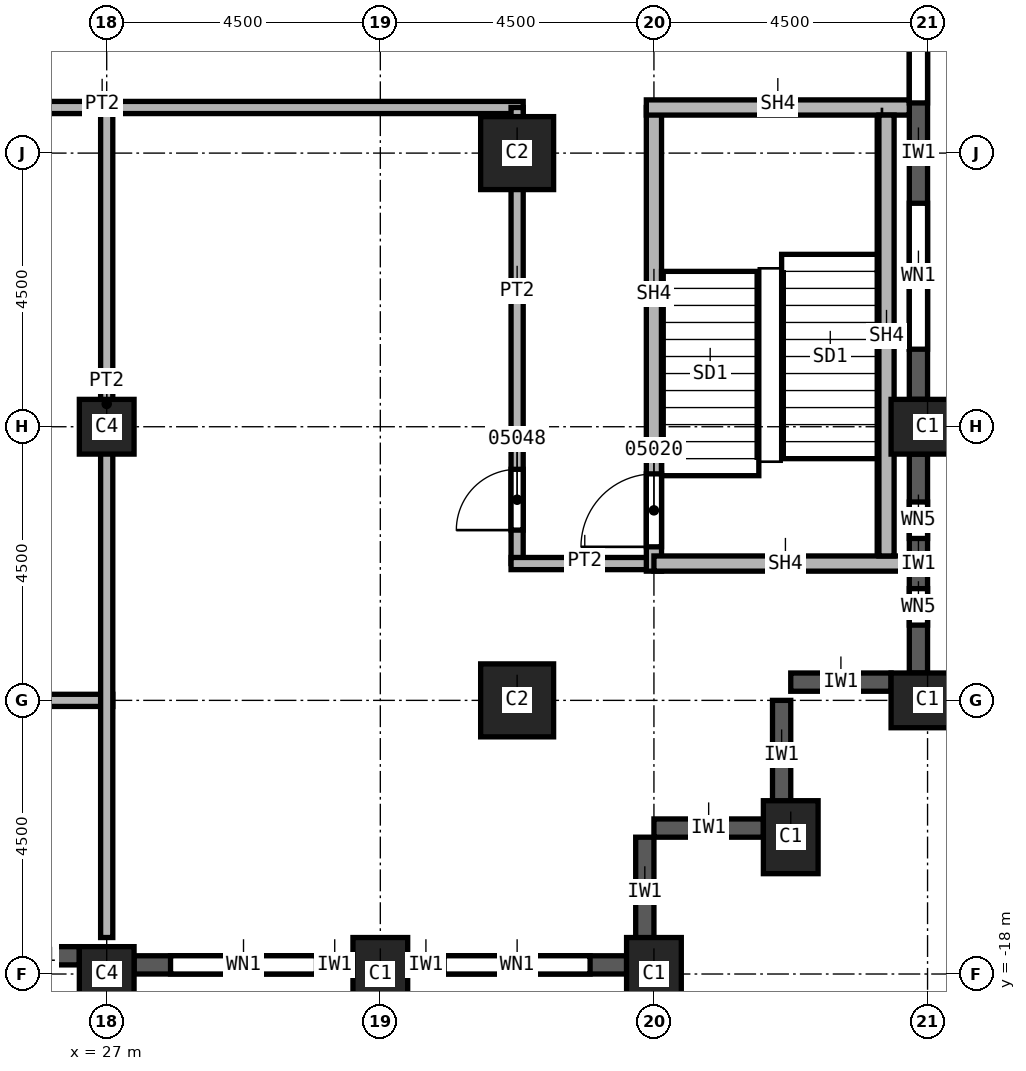
"""IFC4 building model, lengths in metres.
Left out: names, types, materials, properties, quantities, classifications, styles, units other than length and angle.
Written with IfcOpenShell. Run it as: python <this file> out.ifc"""

import sys

from ifc_helpers import new_model, si_unit, direction, frame, frame_2d, origin, origin_2d, place, context, subcontext, project, spatial, rectangle, extrude, element, fill, save


model = new_model("IFC4")
c1 = context("Model", 3, precision=1e-05, world=origin(), true_north=direction((0.0, 1.0)))
c2 = subcontext(c1, "Body", "Model", "MODEL_VIEW")
j1 = project(units=[si_unit("LENGTHUNIT", "METRE"), si_unit("PLANEANGLEUNIT", "RADIAN")], contexts=[c1])
p1 = place(None, origin())
s1 = spatial("IfcSite", under=j1, at=p1, CompositionType="ELEMENT")
p2 = place(p1, origin())
s2 = spatial("IfcBuilding", under=s1, at=p2, CompositionType="ELEMENT")
p3 = place(p2, frame((0.0, 0.0, 116.0)))
s3 = spatial("IfcBuildingStorey", under=s2, at=p3, CompositionType="ELEMENT", Elevation=116.0)
for number, where, z_axis, x_axis in (
    (1, (40.5, -9.0, 0.0), (0.0, 0.0, 1.0), (0.0, 1.0, 0.0)),
    (2, (40.5, -13.5, 0.0), (0.0, 0.0, 1.0), (0.0, 1.0, 0.0)),
    (3, (38.25, -15.75, 0.0), (0.0, 0.0, 1.0), (1.0, 0.0, 0.0)),
    (4, (31.5, -18.0, 0.0), (0.0, 0.0, 1.0), (1.0, 0.0, 0.0)),
    (5, (36.0, -18.0, 0.0), (0.0, 0.0, 1.0), (1.0, 0.0, 0.0)),
):
    element("IfcColumn", number, at=place(p3, frame(where, z_axis=z_axis, x_axis=x_axis)), inside=s3, PredefinedType="COLUMN", context=c2, shape_type="SweptSolid", body=[
        extrude(rectangle(XDim=0.9, YDim=1.2, at=origin_2d()), origin(), (0.0, 0.0, 1.0), 3.6),
    ])
for number, where, z_axis, x_axis in (
    (6, (33.75, -4.5, 0.0), (0.0, 0.0, 1.0), (1.0, 0.0, 0.0)),
    (7, (33.75, -13.5, 0.0), (0.0, 0.0, 1.0), (1.0, 0.0, 0.0)),
):
    element("IfcColumn", number, at=place(p3, frame(where, z_axis=z_axis, x_axis=x_axis)), inside=s3, PredefinedType="COLUMN", context=c2, shape_type="SweptSolid", body=[
        extrude(rectangle(XDim=1.2, YDim=1.2, at=origin_2d()), origin(), (0.0, 0.0, 1.0), 3.6),
    ])
for number, where, z_axis, x_axis in (
    (8, (27.0, -9.0, 0.0), (0.0, 0.0, 1.0), (1.0, 0.0, 0.0)),
    (9, (27.0, -18.0, 0.0), (0.0, 0.0, 1.0), (1.0, 0.0, 0.0)),
):
    element("IfcColumn", number, at=place(p3, frame(where, z_axis=z_axis, x_axis=x_axis)), inside=s3, PredefinedType="COLUMN", context=c2, shape_type="SweptSolid", body=[
        extrude(rectangle(XDim=0.9, YDim=0.9, at=origin_2d()), origin(), (0.0, 0.0, 1.0), 3.6),
    ])
for number, where, z_axis, x_axis in (
    (10, (35.85, -17.55, 0.0), (0.0, 0.0, 1.0), (0.0, 1.0, 0.0)),
    (11, (37.8, -15.6, 0.0), (0.0, 0.0, 1.0), (-1.0, 0.0, 0.0)),
    (12, (38.1, -15.3, 0.0), (0.0, 0.0, 1.0), (0.0, 1.0, 0.0)),
):
    element("IfcWall", number, at=place(p3, frame(where, z_axis=z_axis, x_axis=x_axis)), inside=s3, PredefinedType="SOLIDWALL", context=c2, shape_type="SweptSolid", body=[
        extrude(rectangle(XDim=1.8, YDim=0.3, at=frame_2d((0.9, 0.0))), origin(), (0.0, 0.0, 1.0), 3.0),
    ])
p4 = place(p3, frame((39.9, -13.2, 0.0), z_axis=(0.0, 0.0, 1.0), x_axis=(-1.0, 0.0, 0.0)))
e13 = element("IfcWall", 13, at=p4, inside=s3, PredefinedType="SOLIDWALL", context=c2, shape_type="SweptSolid", body=[
    extrude(rectangle(XDim=1.65, YDim=0.3, at=frame_2d((0.825, 0.0))), origin(), (0.0, 0.0, 1.0), 3.0),
])
p5 = place(p3, frame((25.2, -17.7, 0.0), z_axis=(0.0, 0.0, 1.0), x_axis=(1.0, 0.0, 0.0)))
e14 = element("IfcWall", 14, at=p5, inside=s3, PredefinedType="SOLIDWALL", context=c2, shape_type="SweptSolid", body=[
    extrude(rectangle(XDim=1.35, YDim=0.3, at=frame_2d((0.675, 0.0))), origin(), (0.0, 0.0, 1.0), 3.0),
])
p6 = place(p3, frame((27.45, -17.85, 0.0), z_axis=(0.0, 0.0, 1.0), x_axis=(1.0, 0.0, 0.0)))
e15 = element("IfcWall", 15, at=p6, inside=s3, PredefinedType="SOLIDWALL", context=c2, shape_type="SweptSolid", body=[
    extrude(rectangle(XDim=3.6, YDim=0.3, at=frame_2d((1.8, 0.0))), origin(), (0.0, 0.0, 1.0), 3.0),
])
p7 = place(p6, frame((0.6, 0.0, 0.8)))
e16 = element("IfcOpeningElement", 16, at=p7, cuts=e15, PredefinedType="OPENING", context=c2, shape_type="SweptSolid", body=[
    extrude(rectangle(XDim=2.4, YDim=1.95, at=frame_2d((1.2, 0.975))), frame((0.0, 0.15, 0.0), z_axis=(0.0, -1.0, 0.0), x_axis=(1.0, 0.0, 0.0)), (0.0, 0.0, 1.0), 0.3),
])
p8 = place(p3, frame((31.95, -17.85, 0.0), z_axis=(0.0, 0.0, 1.0), x_axis=(1.0, 0.0, 0.0)))
e17 = element("IfcWall", 17, at=p8, inside=s3, PredefinedType="SOLIDWALL", context=c2, shape_type="SweptSolid", body=[
    extrude(rectangle(XDim=3.6, YDim=0.3, at=frame_2d((1.8, 0.0))), origin(), (0.0, 0.0, 1.0), 3.0),
])
p9 = place(p8, frame((0.6, 0.0, 0.8)))
e18 = element("IfcOpeningElement", 18, at=p9, cuts=e17, PredefinedType="OPENING", context=c2, shape_type="SweptSolid", body=[
    extrude(rectangle(XDim=2.4, YDim=1.95, at=frame_2d((1.2, 0.975))), frame((0.0, 0.15, 0.0), z_axis=(0.0, -1.0, 0.0), x_axis=(1.0, 0.0, 0.0)), (0.0, 0.0, 1.0), 0.3),
])
p10 = place(p3, frame((40.35, -13.05, 0.0), z_axis=(0.0, 0.0, 1.0), x_axis=(0.0, 1.0, 0.0)))
e19 = element("IfcWall", 19, at=p10, inside=s3, PredefinedType="SOLIDWALL", context=c2, shape_type="SweptSolid", body=[
    extrude(rectangle(XDim=3.6, YDim=0.3, at=frame_2d((1.8, 0.0))), origin(), (0.0, 0.0, 1.0), 3.0),
])
p11 = place(p10, frame((0.788, 0.0, 0.8)))
e20 = element("IfcOpeningElement", 20, at=p11, cuts=e19, PredefinedType="OPENING", context=c2, shape_type="SweptSolid", body=[
    extrude(rectangle(XDim=0.6, YDim=1.95, at=frame_2d((0.3, 0.975))), frame((0.0, 0.15, 0.0), z_axis=(0.0, -1.0, 0.0), x_axis=(1.0, 0.0, 0.0)), (0.0, 0.0, 1.0), 0.3),
])
p12 = place(p10, frame((2.212, 0.0, 0.8)))
e21 = element("IfcOpeningElement", 21, at=p12, cuts=e19, PredefinedType="OPENING", context=c2, shape_type="SweptSolid", body=[
    extrude(rectangle(XDim=0.6, YDim=1.95, at=frame_2d((0.3, 0.975))), frame((0.0, 0.15, 0.0), z_axis=(0.0, -1.0, 0.0), x_axis=(1.0, 0.0, 0.0)), (0.0, 0.0, 1.0), 0.3),
])
p13 = place(p3, frame((40.35, -8.55, 0.0), z_axis=(0.0, 0.0, 1.0), x_axis=(0.0, 1.0, 0.0)))
e22 = element("IfcWall", 22, at=p13, inside=s3, PredefinedType="SOLIDWALL", context=c2, shape_type="SweptSolid", body=[
    extrude(rectangle(XDim=8.1, YDim=0.3, at=frame_2d((4.05, 0.0))), origin(), (0.0, 0.0, 1.0), 3.0),
])
p14 = place(p13, frame((0.825, 0.0, 0.8)))
e23 = element("IfcOpeningElement", 23, at=p14, cuts=e22, PredefinedType="OPENING", context=c2, shape_type="SweptSolid", body=[
    extrude(rectangle(XDim=2.4, YDim=1.95, at=frame_2d((1.2, 0.975))), frame((0.0, 0.15, 0.0), z_axis=(0.0, -1.0, 0.0), x_axis=(1.0, 0.0, 0.0)), (0.0, 0.0, 1.0), 0.3),
])
p15 = place(p13, frame((4.875, 0.0, 0.8)))
e24 = element("IfcOpeningElement", 24, at=p15, cuts=e22, PredefinedType="OPENING", context=c2, shape_type="SweptSolid", body=[
    extrude(rectangle(XDim=2.4, YDim=1.95, at=frame_2d((1.2, 0.975))), frame((0.0, 0.15, 0.0), z_axis=(0.0, -1.0, 0.0), x_axis=(1.0, 0.0, 0.0)), (0.0, 0.0, 1.0), 0.3),
])
p16 = place(p3, frame((19.9, -13.5, 0.0), z_axis=(0.0, 0.0, 1.0), x_axis=(1.0, 0.0, 0.0)))
e25 = element("IfcWall", 25, at=p16, inside=s3, PredefinedType="PARTITIONING", context=c2, shape_type="SweptSolid", body=[
    extrude(rectangle(XDim=7.2, YDim=0.2, at=frame_2d((3.6, 0.0))), origin(), (0.0, 0.0, 1.0), 3.6),
])
p17 = place(p3, frame((33.85, -3.75, 0.0), z_axis=(0.0, 0.0, 1.0), x_axis=(-1.0, 0.0, 0.0)))
e26 = element("IfcWall", 26, at=p17, inside=s3, PredefinedType="PARTITIONING", context=c2, shape_type="SweptSolid", body=[
    extrude(rectangle(XDim=13.95, YDim=0.2, at=frame_2d((6.975, 0.0))), origin(), (0.0, 0.0, 1.0), 3.6),
])
p18 = place(p3, frame((27.0, -3.75, 0.0), z_axis=(0.0, 0.0, 1.0), x_axis=(0.0, -1.0, 0.0)))
e27 = element("IfcWall", 27, at=p18, inside=s3, PredefinedType="PARTITIONING", context=c2, shape_type="SweptSolid", body=[
    extrude(rectangle(XDim=13.65, YDim=0.2, at=frame_2d((6.825, 0.0))), origin(), (0.0, 0.0, 1.0), 3.6),
])
p19 = place(p3, frame((33.75, -11.25, 0.0), z_axis=(0.0, 0.0, 1.0), x_axis=(0.0, 1.0, 0.0)))
e28 = element("IfcWall", 28, at=p19, inside=s3, PredefinedType="PARTITIONING", context=c2, shape_type="SweptSolid", body=[
    extrude(rectangle(XDim=7.5, YDim=0.2, at=frame_2d((3.75, 0.0))), origin(), (0.0, 0.0, 1.0), 3.6),
])
p20 = place(p19, frame((0.55, 0.0, 0.0)))
e29 = element("IfcOpeningElement", 29, at=p20, cuts=e28, PredefinedType="OPENING", context=c2, shape_type="SweptSolid", body=[
    extrude(rectangle(XDim=1.0, YDim=2.1, at=frame_2d((0.5, 1.05))), frame((0.0, 0.1, 0.0), z_axis=(0.0, -1.0, 0.0), x_axis=(1.0, 0.0, 0.0)), (0.0, 0.0, 1.0), 0.2),
])
p21 = place(p3, frame((36.0, -11.25, 0.0), z_axis=(0.0, 0.0, 1.0), x_axis=(-1.0, 0.0, 0.0)))
e30 = element("IfcWall", 30, at=p21, inside=s3, PredefinedType="PARTITIONING", context=c2, shape_type="SweptSolid", body=[
    extrude(rectangle(XDim=2.35, YDim=0.2, at=frame_2d((1.175, 0.0))), origin(), (0.0, 0.0, 1.0), 3.6),
])
p22 = place(p3, frame((36.0, -11.375, 0.0), z_axis=(0.0, 0.0, 1.0), x_axis=(0.0, 1.0, 0.0)))
e31 = element("IfcWall", 31, at=p22, inside=s3, PredefinedType="SOLIDWALL", context=c2, shape_type="SweptSolid", body=[
    extrude(rectangle(XDim=7.625, YDim=0.25, at=frame_2d((3.812, 0.0))), origin(), (0.0, 0.0, 1.0), 3.6),
])
p23 = place(p22, frame((0.4, 0.0, 0.0)))
e32 = element("IfcOpeningElement", 32, at=p23, cuts=e31, PredefinedType="OPENING", context=c2, shape_type="SweptSolid", body=[
    extrude(rectangle(XDim=1.2, YDim=2.1, at=frame_2d((0.6, 1.05))), frame((0.0, 0.125, 0.0), z_axis=(0.0, -1.0, 0.0), x_axis=(1.0, 0.0, 0.0)), (0.0, 0.0, 1.0), 0.25),
])
p24 = place(p3, frame((40.2, -11.25, 0.0), z_axis=(0.0, 0.0, 1.0), x_axis=(-1.0, 0.0, 0.0)))
e33 = element("IfcWall", 33, at=p24, inside=s3, PredefinedType="SOLIDWALL", context=c2, shape_type="SweptSolid", body=[
    extrude(rectangle(XDim=4.2, YDim=0.25, at=frame_2d((2.1, 0.0))), origin(), (0.0, 0.0, 1.0), 3.6),
])
p25 = place(p3, frame((40.2, -3.75, 0.0), z_axis=(0.0, 0.0, 1.0), x_axis=(-1.0, 0.0, 0.0)))
e34 = element("IfcWall", 34, at=p25, inside=s3, PredefinedType="SOLIDWALL", context=c2, shape_type="SweptSolid", body=[
    extrude(rectangle(XDim=4.325, YDim=0.25, at=frame_2d((2.163, 0.0))), origin(), (0.0, 0.0, 1.0), 3.6),
])
p26 = place(p3, frame((39.825, -11.125, 0.0), z_axis=(0.0, 0.0, 1.0), x_axis=(0.0, 1.0, 0.0)))
e35 = element("IfcWall", 35, at=p26, inside=s3, PredefinedType="SOLIDWALL", context=c2, shape_type="SweptSolid", body=[
    extrude(rectangle(XDim=7.25, YDim=0.25, at=frame_2d((3.625, 0.0))), origin(), (0.0, 0.0, 1.0), 3.6),
])
p27 = place(p7, origin())
e36 = element("IfcWindow", 36, at=p27, inside=s3, PartitioningType="SINGLE_PANEL", PredefinedType="WINDOW", context=c2, shape_type="SweptSolid", body=[
    extrude(rectangle(XDim=2.4, YDim=1.95, at=frame_2d((1.2, 0.975))), frame((0.0, 0.03, 0.0), z_axis=(0.0, -1.0, 0.0), x_axis=(1.0, 0.0, 0.0)), (0.0, 0.0, 1.0), 0.06),
])
fill(e16, e36)
p28 = place(p9, origin())
e37 = element("IfcWindow", 37, at=p28, inside=s3, PartitioningType="SINGLE_PANEL", PredefinedType="WINDOW", context=c2, shape_type="SweptSolid", body=[
    extrude(rectangle(XDim=2.4, YDim=1.95, at=frame_2d((1.2, 0.975))), frame((0.0, 0.03, 0.0), z_axis=(0.0, -1.0, 0.0), x_axis=(1.0, 0.0, 0.0)), (0.0, 0.0, 1.0), 0.06),
])
fill(e18, e37)
p29 = place(p14, origin())
e38 = element("IfcWindow", 38, at=p29, inside=s3, PartitioningType="SINGLE_PANEL", PredefinedType="WINDOW", context=c2, shape_type="SweptSolid", body=[
    extrude(rectangle(XDim=2.4, YDim=1.95, at=frame_2d((1.2, 0.975))), frame((0.0, 0.03, 0.0), z_axis=(0.0, -1.0, 0.0), x_axis=(1.0, 0.0, 0.0)), (0.0, 0.0, 1.0), 0.06),
])
fill(e23, e38)
p30 = place(p15, origin())
e39 = element("IfcWindow", 39, at=p30, inside=s3, PartitioningType="SINGLE_PANEL", PredefinedType="WINDOW", context=c2, shape_type="SweptSolid", body=[
    extrude(rectangle(XDim=2.4, YDim=1.95, at=frame_2d((1.2, 0.975))), frame((0.0, 0.03, 0.0), z_axis=(0.0, -1.0, 0.0), x_axis=(1.0, 0.0, 0.0)), (0.0, 0.0, 1.0), 0.06),
])
fill(e24, e39)
p31 = place(p23, origin())
e40 = element("IfcDoor", 40, at=p31, inside=s3, OperationType="SINGLE_SWING_LEFT", PredefinedType="DOOR", context=c2, shape_type="SweptSolid", body=[
    extrude(rectangle(XDim=1.2, YDim=2.1, at=frame_2d((0.6, 1.05))), frame((0.0, 0.025, 0.0), z_axis=(0.0, -1.0, 0.0), x_axis=(1.0, 0.0, 0.0)), (0.0, 0.0, 1.0), 0.05),
])
fill(e32, e40)
p32 = place(p20, origin())
e41 = element("IfcDoor", 41, at=p32, inside=s3, OperationType="SINGLE_SWING_LEFT", PredefinedType="DOOR", context=c2, shape_type="SweptSolid", body=[
    extrude(rectangle(XDim=1.0, YDim=2.1, at=frame_2d((0.5, 1.05))), frame((0.0, 0.025, 0.0), z_axis=(0.0, -1.0, 0.0), x_axis=(1.0, 0.0, 0.0)), (0.0, 0.0, 1.0), 0.05),
])
fill(e29, e41)
p33 = place(p11, origin())
e42 = element("IfcWindow", 42, at=p33, inside=s3, PartitioningType="SINGLE_PANEL", PredefinedType="WINDOW", context=c2, shape_type="SweptSolid", body=[
    extrude(rectangle(XDim=0.6, YDim=1.95, at=frame_2d((0.3, 0.975))), frame((0.0, 0.03, 0.0), z_axis=(0.0, -1.0, 0.0), x_axis=(1.0, 0.0, 0.0)), (0.0, 0.0, 1.0), 0.06),
])
fill(e20, e42)
p34 = place(p12, origin())
e43 = element("IfcWindow", 43, at=p34, inside=s3, PartitioningType="SINGLE_PANEL", PredefinedType="WINDOW", context=c2, shape_type="SweptSolid", body=[
    extrude(rectangle(XDim=0.6, YDim=1.95, at=frame_2d((0.3, 0.975))), frame((0.0, 0.03, 0.0), z_axis=(0.0, -1.0, 0.0), x_axis=(1.0, 0.0, 0.0)), (0.0, 0.0, 1.0), 0.06),
])
fill(e21, e43)
save(model, sys.argv[1])
